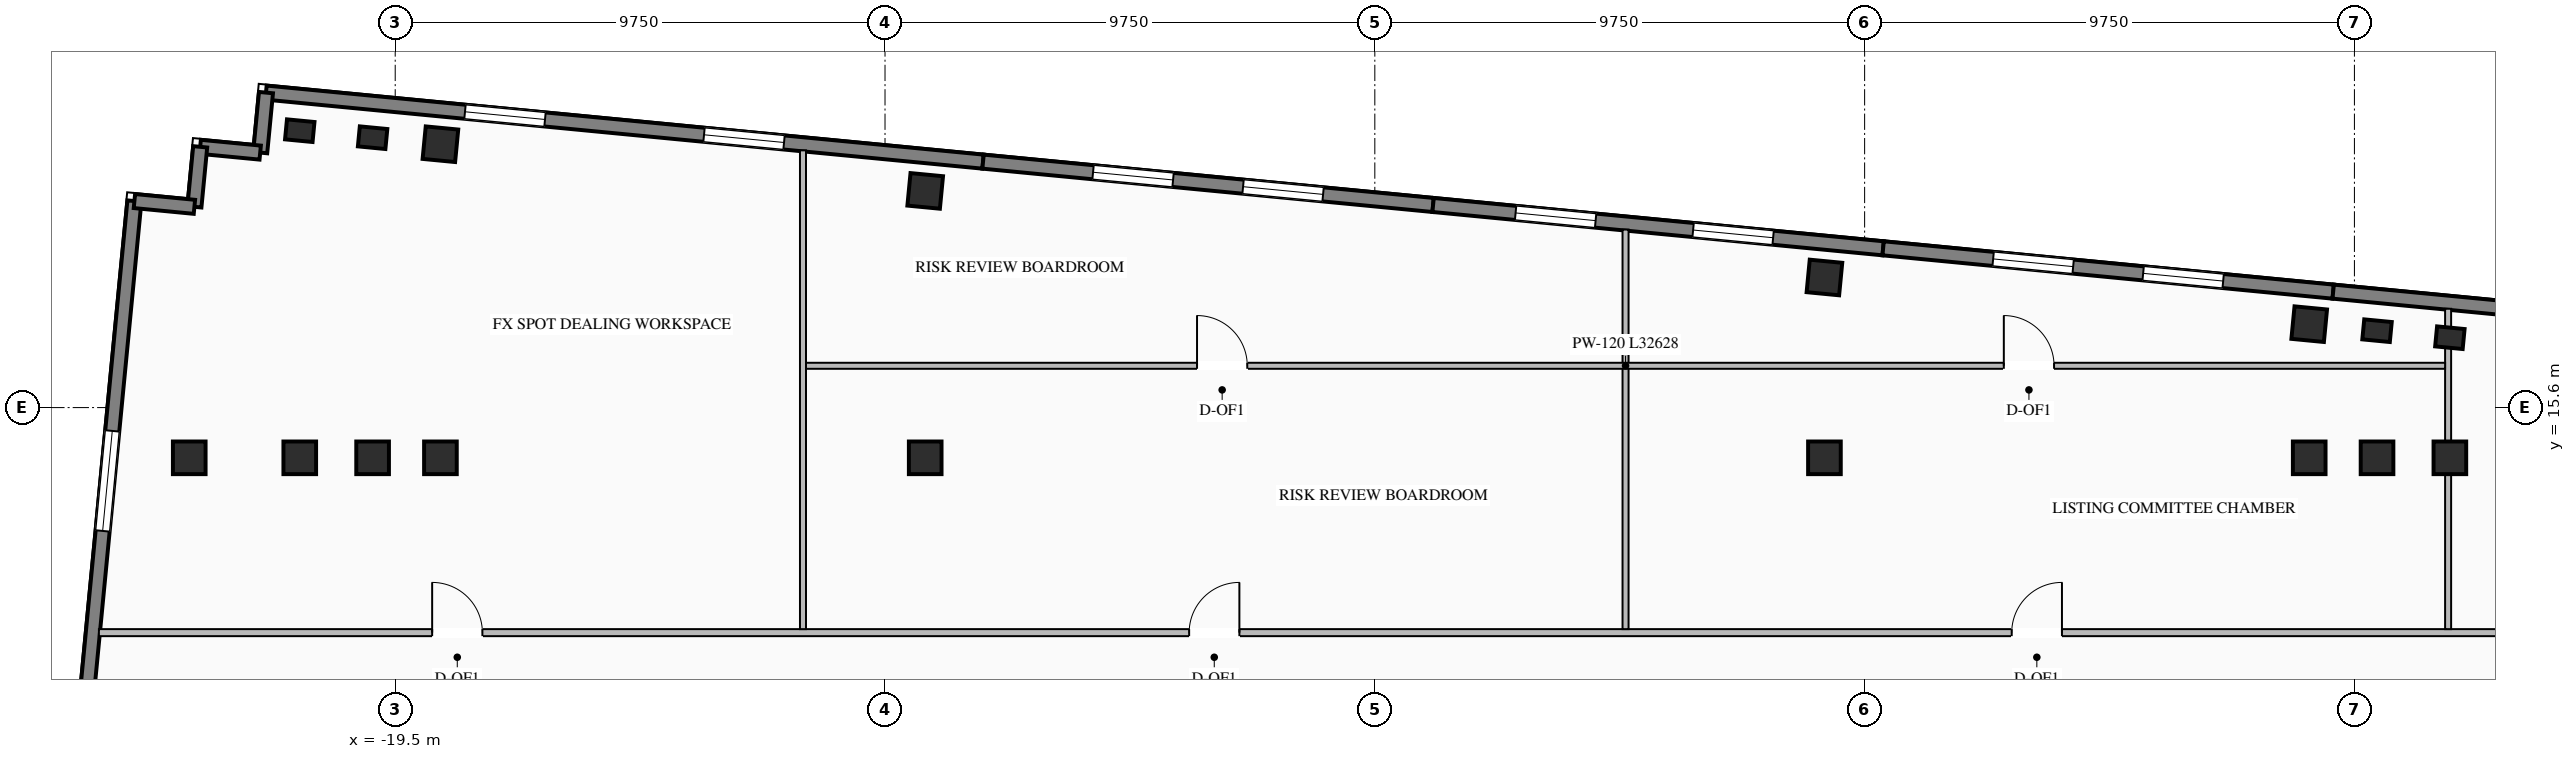
"""IFC4 building model, lengths in metres.
Left out: names, types, materials, properties, quantities, classifications, styles, units other than length and angle.
Written with IfcOpenShell. Run it as: python <this file> out.ifc"""

import sys

from ifc_helpers import new_model, si_unit, direction, frame, frame_2d, origin, origin_2d, place, context, subcontext, project, spatial, rectangle, i_section, extrude, element, fill, save


model = new_model("IFC4")
c1 = context("Model", 3, precision=1e-05, world=origin(), true_north=direction((0.0, 1.0)))
c2 = subcontext(c1, "Body", "Model", "MODEL_VIEW")
j1 = project(units=[si_unit("LENGTHUNIT", "METRE"), si_unit("PLANEANGLEUNIT", "RADIAN")], contexts=[c1])
p1 = place(None, origin())
s1 = spatial("IfcSite", under=j1, at=p1, CompositionType="ELEMENT")
p2 = place(p1, origin())
s2 = spatial("IfcBuilding", under=s1, at=p2, CompositionType="ELEMENT")
p3 = place(p2, frame((0.0, 0.0, 181.1)))
s3 = spatial("IfcBuildingStorey", under=s2, at=p3, CompositionType="ELEMENT", Elevation=181.1)
for number, where, z_axis, x_axis in (
    (1, (-21.4, 14.6, 0.0), (0.0, 0.0, 1.0), (1.0, 0.0, 0.0)),
    (2, (-19.95, 14.6, 0.0), (0.0, 0.0, 1.0), (1.0, 0.0, 0.0)),
    (3, (-18.6, 14.6, 0.0), (0.0, 0.0, 1.0), (1.0, 0.0, 0.0)),
    (4, (-8.95, 14.6, 0.0), (0.0, 0.0, 1.0), (1.0, 0.0, 0.0)),
    (5, (8.95, 14.6, 0.0), (0.0, 0.0, 1.0), (1.0, 0.0, 0.0)),
    (6, (18.6, 14.6, 0.0), (0.0, 0.0, 1.0), (1.0, 0.0, 0.0)),
    (7, (19.95, 14.6, 0.0), (0.0, 0.0, 1.0), (1.0, 0.0, 0.0)),
    (8, (21.4, 14.6, 0.0), (0.0, 0.0, 1.0), (1.0, 0.0, 0.0)),
    (9, (-23.6, 14.6, 0.0), (0.0, 0.0, 1.0), (1.0, 0.0, 0.0)),
    (10, (-18.6, 20.842, 0.0), (0.0, 0.0, 1.0), (0.995, -0.096, 0.0)),
    (11, (-8.95, 19.913, 0.0), (0.0, 0.0, 1.0), (0.995, -0.096, 0.0)),
    (12, (8.95, 18.19, 0.0), (0.0, 0.0, 1.0), (0.995, -0.096, 0.0)),
    (13, (18.6, 17.26, 0.0), (0.0, 0.0, 1.0), (0.995, -0.096, 0.0)),
):
    element("IfcColumn", number, at=place(p3, frame(where, z_axis=z_axis, x_axis=x_axis)), inside=s3, PredefinedType="COLUMN", context=c2, shape_type="SweptSolid", body=[
        extrude(i_section(OverallWidth=0.65, OverallDepth=0.65, WebThickness=0.028, FlangeThickness=0.04, at=origin_2d()), origin(), (0.0, 0.0, 1.0), 3.45),
    ])
for number, where, z_axis, x_axis in (
    (14, (-21.4, 21.112, 0.0), (0.0, 0.0, 1.0), (0.995, -0.096, 0.0)),
    (15, (-19.95, 20.972, 0.0), (0.0, 0.0, 1.0), (0.995, -0.096, 0.0)),
    (16, (19.95, 17.131, 0.0), (0.0, 0.0, 1.0), (0.995, -0.096, 0.0)),
    (17, (21.4, 16.991, 0.0), (0.0, 0.0, 1.0), (0.995, -0.096, 0.0)),
):
    element("IfcColumn", number, at=place(p3, frame(where, z_axis=z_axis, x_axis=x_axis)), inside=s3, PredefinedType="PILASTER", context=c2, shape_type="SweptSolid", body=[
        extrude(rectangle(XDim=0.55, YDim=0.4, at=origin_2d()), origin(), (0.0, 0.0, 1.0), 3.45),
    ])
p4 = place(p3, frame((-22.073, 21.87, 0.0), z_axis=(0.0, 0.0, 1.0), x_axis=(0.995395606285, -0.095851901334, 0.0)))
e18 = element("IfcWall", 18, at=p4, inside=s3, PredefinedType="STANDARD", context=c2, shape_type="SweptSolid", body=[
    extrude(rectangle(XDim=14.34, YDim=0.28, at=frame_2d((7.17, 0.0))), origin(), (0.0, 0.0, 1.0), 3.25),
])
p5 = place(p4, frame((3.98, 0.0, 0.76)))
e19 = element("IfcOpeningElement", 19, at=p5, cuts=e18, PredefinedType="OPENING", context=c2, shape_type="SweptSolid", body=[
    extrude(rectangle(XDim=1.6, YDim=1.95, at=frame_2d((0.8, 0.975))), frame((0.0, 0.15, 0.0), z_axis=(0.0, -1.0, 0.0), x_axis=(1.0, 0.0, 0.0)), (0.0, 0.0, 1.0), 0.3),
])
p6 = place(p4, frame((8.76, 0.0, 0.76)))
e20 = element("IfcOpeningElement", 20, at=p6, cuts=e18, PredefinedType="OPENING", context=c2, shape_type="SweptSolid", body=[
    extrude(rectangle(XDim=1.6, YDim=1.95, at=frame_2d((0.8, 0.975))), frame((0.0, 0.15, 0.0), z_axis=(0.0, -1.0, 0.0), x_axis=(1.0, 0.0, 0.0)), (0.0, 0.0, 1.0), 0.3),
])
p7 = place(p3, frame((-7.799, 20.496, 0.0), z_axis=(0.0, 0.0, 1.0), x_axis=(0.995396794462, -0.09583956164, 0.0)))
e21 = element("IfcWall", 21, at=p7, inside=s3, PredefinedType="STANDARD", context=c2, shape_type="SweptSolid", body=[
    extrude(rectangle(XDim=9.0, YDim=0.28, at=frame_2d((4.5, 0.0))), origin(), (0.0, 0.0, 1.0), 3.25),
])
p8 = place(p7, frame((2.2, 0.0, 0.76)))
e22 = element("IfcOpeningElement", 22, at=p8, cuts=e21, PredefinedType="OPENING", context=c2, shape_type="SweptSolid", body=[
    extrude(rectangle(XDim=1.6, YDim=1.95, at=frame_2d((0.8, 0.975))), frame((0.0, 0.15, 0.0), z_axis=(0.0, -1.0, 0.0), x_axis=(1.0, 0.0, 0.0)), (0.0, 0.0, 1.0), 0.3),
])
p9 = place(p7, frame((5.2, 0.0, 0.76)))
e23 = element("IfcOpeningElement", 23, at=p9, cuts=e21, PredefinedType="OPENING", context=c2, shape_type="SweptSolid", body=[
    extrude(rectangle(XDim=1.6, YDim=1.95, at=frame_2d((0.8, 0.975))), frame((0.0, 0.15, 0.0), z_axis=(0.0, -1.0, 0.0), x_axis=(1.0, 0.0, 0.0)), (0.0, 0.0, 1.0), 0.3),
])
p10 = place(p3, frame((1.16, 19.633, 0.0), z_axis=(0.0, 0.0, 1.0), x_axis=(0.995394455533, -0.09586385082, 0.0)))
e24 = element("IfcWall", 24, at=p10, inside=s3, PredefinedType="STANDARD", context=c2, shape_type="SweptSolid", body=[
    extrude(rectangle(XDim=9.0, YDim=0.28, at=frame_2d((4.5, 0.0))), origin(), (0.0, 0.0, 1.0), 3.25),
])
p11 = place(p10, frame((1.65, 0.0, 0.76)))
e25 = element("IfcOpeningElement", 25, at=p11, cuts=e24, PredefinedType="OPENING", context=c2, shape_type="SweptSolid", body=[
    extrude(rectangle(XDim=1.6, YDim=1.95, at=frame_2d((0.8, 0.975))), frame((0.0, 0.15, 0.0), z_axis=(0.0, -1.0, 0.0), x_axis=(1.0, 0.0, 0.0)), (0.0, 0.0, 1.0), 0.3),
])
p12 = place(p10, frame((5.2, 0.0, 0.76)))
e26 = element("IfcOpeningElement", 26, at=p12, cuts=e24, PredefinedType="OPENING", context=c2, shape_type="SweptSolid", body=[
    extrude(rectangle(XDim=1.6, YDim=1.95, at=frame_2d((0.8, 0.975))), frame((0.0, 0.15, 0.0), z_axis=(0.0, -1.0, 0.0), x_axis=(1.0, 0.0, 0.0)), (0.0, 0.0, 1.0), 0.3),
])
p13 = place(p3, frame((10.119, 18.77, 0.0), z_axis=(0.0, 0.0, 1.0), x_axis=(0.995396794462, -0.09583956164, 0.0)))
e27 = element("IfcWall", 27, at=p13, inside=s3, PredefinedType="STANDARD", context=c2, shape_type="SweptSolid", body=[
    extrude(rectangle(XDim=9.0, YDim=0.28, at=frame_2d((4.5, 0.0))), origin(), (0.0, 0.0, 1.0), 3.25),
])
p14 = place(p13, frame((2.2, 0.0, 0.76)))
e28 = element("IfcOpeningElement", 28, at=p14, cuts=e27, PredefinedType="OPENING", context=c2, shape_type="SweptSolid", body=[
    extrude(rectangle(XDim=1.6, YDim=1.95, at=frame_2d((0.8, 0.975))), frame((0.0, 0.15, 0.0), z_axis=(0.0, -1.0, 0.0), x_axis=(1.0, 0.0, 0.0)), (0.0, 0.0, 1.0), 0.3),
])
p15 = place(p13, frame((5.2, 0.0, 0.76)))
e29 = element("IfcOpeningElement", 29, at=p15, cuts=e27, PredefinedType="OPENING", context=c2, shape_type="SweptSolid", body=[
    extrude(rectangle(XDim=1.6, YDim=1.95, at=frame_2d((0.8, 0.975))), frame((0.0, 0.15, 0.0), z_axis=(0.0, -1.0, 0.0), x_axis=(1.0, 0.0, 0.0)), (0.0, 0.0, 1.0), 0.3),
])
p16 = place(p3, frame((19.077, 17.908, 0.0), z_axis=(0.0, 0.0, 1.0), x_axis=(0.995395606285, -0.095851901334, 0.0)))
e30 = element("IfcWall", 30, at=p16, inside=s3, PredefinedType="STANDARD", context=c2, shape_type="SweptSolid", body=[
    extrude(rectangle(XDim=14.34, YDim=0.28, at=frame_2d((7.17, 0.0))), origin(), (0.0, 0.0, 1.0), 3.25),
])
p17 = place(p16, frame((3.98, 0.0, 0.76)))
e31 = element("IfcOpeningElement", 31, at=p17, cuts=e30, PredefinedType="OPENING", context=c2, shape_type="SweptSolid", body=[
    extrude(rectangle(XDim=1.6, YDim=1.95, at=frame_2d((0.8, 0.975))), frame((0.0, 0.15, 0.0), z_axis=(0.0, -1.0, 0.0), x_axis=(1.0, 0.0, 0.0)), (0.0, 0.0, 1.0), 0.3),
])
p18 = place(p16, frame((8.76, 0.0, 0.76)))
e32 = element("IfcOpeningElement", 32, at=p18, cuts=e30, PredefinedType="OPENING", context=c2, shape_type="SweptSolid", body=[
    extrude(rectangle(XDim=1.6, YDim=1.95, at=frame_2d((0.8, 0.975))), frame((0.0, 0.15, 0.0), z_axis=(0.0, -1.0, 0.0), x_axis=(1.0, 0.0, 0.0)), (0.0, 0.0, 1.0), 0.3),
])
p19 = place(p3, frame((-26.301, 2.998, 0.0), z_axis=(0.0, 0.0, 1.0), x_axis=(0.095837640115, 0.99539697947, 0.0)))
e33 = element("IfcWall", 33, at=p19, inside=s3, PredefinedType="STANDARD", context=c2, shape_type="SweptSolid", body=[
    extrude(rectangle(XDim=16.79, YDim=0.28, at=frame_2d((8.395, 0.0))), origin(), (0.0, 0.0, 1.0), 3.25),
])
p20 = place(p19, frame((3.547, 0.0, 0.76)))
e34 = element("IfcOpeningElement", 34, at=p20, cuts=e33, PredefinedType="OPENING", context=c2, shape_type="SweptSolid", body=[
    extrude(rectangle(XDim=2.0, YDim=2.05, at=frame_2d((1.0, 1.025))), frame((0.0, 0.15, 0.0), z_axis=(0.0, -1.0, 0.0), x_axis=(1.0, 0.0, 0.0)), (0.0, 0.0, 1.0), 0.3),
])
p21 = place(p19, frame((10.193, 0.0, 0.76)))
e35 = element("IfcOpeningElement", 35, at=p21, cuts=e33, PredefinedType="OPENING", context=c2, shape_type="SweptSolid", body=[
    extrude(rectangle(XDim=2.0, YDim=2.05, at=frame_2d((1.0, 1.025))), frame((0.0, 0.15, 0.0), z_axis=(0.0, -1.0, 0.0), x_axis=(1.0, 0.0, 0.0)), (0.0, 0.0, 1.0), 0.3),
])
for number, where, z_axis, x_axis in (
    (36, (-22.073, 21.87, 0.0), (0.0, 0.0, 1.0), (-0.096, -0.995, 0.0)),
    (37, (-22.188, 20.676, 0.0), (0.0, 0.0, 1.0), (-0.995, 0.096, 0.0)),
    (38, (-23.382, 20.791, 0.0), (0.0, 0.0, 1.0), (-0.096, -0.995, 0.0)),
    (39, (-23.497, 19.596, 0.0), (0.0, 0.0, 1.0), (-0.995, 0.096, 0.0)),
):
    element("IfcWall", number, at=place(p3, frame(where, z_axis=z_axis, x_axis=x_axis)), inside=s3, PredefinedType="STANDARD", context=c2, shape_type="SweptSolid", body=[
        extrude(rectangle(XDim=1.2, YDim=0.28, at=frame_2d((0.6, 0.0))), origin(), (0.0, 0.0, 1.0), 3.25),
    ])
p22 = place(p3, frame((-25.398, 11.12, 0.0), z_axis=(0.0, 0.0, 1.0), x_axis=(1.0, 0.0, 0.0)))
e40 = element("IfcWall", 40, at=p22, inside=s3, PredefinedType="STANDARD", context=c2, shape_type="SweptSolid", body=[
    extrude(rectangle(XDim=60.519, YDim=0.14, at=frame_2d((30.259, 0.0))), origin(), (0.0, 0.0, 1.0), 3.25),
])
p23 = place(p22, frame((6.634, 0.0, 0.0)))
e41 = element("IfcOpeningElement", 41, at=p23, cuts=e40, PredefinedType="OPENING", context=c2, shape_type="SweptSolid", body=[
    extrude(rectangle(XDim=1.0, YDim=2.08, at=frame_2d((0.5, 1.04))), frame((0.0, 0.08, 0.0), z_axis=(0.0, -1.0, 0.0), x_axis=(1.0, 0.0, 0.0)), (0.0, 0.0, 1.0), 0.16),
])
p24 = place(p22, frame((21.702, 0.0, 0.0)))
e42 = element("IfcOpeningElement", 42, at=p24, cuts=e40, PredefinedType="OPENING", context=c2, shape_type="SweptSolid", body=[
    extrude(rectangle(XDim=1.0, YDim=2.08, at=frame_2d((0.5, 1.04))), frame((0.0, 0.08, 0.0), z_axis=(0.0, -1.0, 0.0), x_axis=(1.0, 0.0, 0.0)), (0.0, 0.0, 1.0), 0.16),
])
p25 = place(p22, frame((38.076, 0.0, 0.0)))
e43 = element("IfcOpeningElement", 43, at=p25, cuts=e40, PredefinedType="OPENING", context=c2, shape_type="SweptSolid", body=[
    extrude(rectangle(XDim=1.0, YDim=2.08, at=frame_2d((0.5, 1.04))), frame((0.0, 0.08, 0.0), z_axis=(0.0, -1.0, 0.0), x_axis=(1.0, 0.0, 0.0)), (0.0, 0.0, 1.0), 0.16),
])
p26 = place(p22, frame((53.015, 0.0, 0.0)))
e44 = element("IfcOpeningElement", 44, at=p26, cuts=e40, PredefinedType="OPENING", context=c2, shape_type="SweptSolid", body=[
    extrude(rectangle(XDim=1.0, YDim=2.08, at=frame_2d((0.5, 1.04))), frame((0.0, 0.08, 0.0), z_axis=(0.0, -1.0, 0.0), x_axis=(1.0, 0.0, 0.0)), (0.0, 0.0, 1.0), 0.16),
])
p27 = place(p3, frame((-11.383, 11.19, 0.0), z_axis=(0.0, 0.0, 1.0), x_axis=(0.0, 1.0, 0.0)))
e45 = element("IfcWall", 45, at=p27, inside=s3, PredefinedType="STANDARD", context=c2, shape_type="SweptSolid", body=[
    extrude(rectangle(XDim=9.53, YDim=0.12, at=frame_2d((4.765, 0.0))), origin(), (0.0, 0.0, 1.0), 3.25),
])
p28 = place(p3, frame((4.991, 11.19, 0.0), z_axis=(0.0, 0.0, 1.0), x_axis=(0.0, 1.0, 0.0)))
e46 = element("IfcWall", 46, at=p28, inside=s3, PredefinedType="STANDARD", context=c2, shape_type="SweptSolid", body=[
    extrude(rectangle(XDim=7.954, YDim=0.12, at=frame_2d((3.977, 0.0))), origin(), (0.0, 0.0, 1.0), 3.25),
])
p29 = place(p3, frame((21.365, 11.19, 0.0), z_axis=(0.0, 0.0, 1.0), x_axis=(0.0, 1.0, 0.0)))
e47 = element("IfcWall", 47, at=p29, inside=s3, PredefinedType="STANDARD", context=c2, shape_type="SweptSolid", body=[
    extrude(rectangle(XDim=6.377, YDim=0.12, at=frame_2d((3.188, 0.0))), origin(), (0.0, 0.0, 1.0), 2.645),
])
p30 = place(p3, frame((-11.323, 16.432, 0.0), z_axis=(0.0, 0.0, 1.0), x_axis=(1.0, 0.0, 0.0)))
e48 = element("IfcWall", 48, at=p30, inside=s3, PredefinedType="STANDARD", context=c2, shape_type="SweptSolid", body=[
    extrude(rectangle(XDim=32.628, YDim=0.12, at=frame_2d((16.314, 0.0))), origin(), (0.0, 0.0, 1.0), 3.25),
])
p31 = place(p30, frame((7.784, 0.0, 0.0)))
e49 = element("IfcOpeningElement", 49, at=p31, cuts=e48, PredefinedType="OPENING", context=c2, shape_type="SweptSolid", body=[
    extrude(rectangle(XDim=1.0, YDim=2.08, at=frame_2d((0.5, 1.04))), frame((0.0, 0.07, 0.0), z_axis=(0.0, -1.0, 0.0), x_axis=(1.0, 0.0, 0.0)), (0.0, 0.0, 1.0), 0.14),
])
p32 = place(p30, frame((23.844, 0.0, 0.0)))
e50 = element("IfcOpeningElement", 50, at=p32, cuts=e48, PredefinedType="OPENING", context=c2, shape_type="SweptSolid", body=[
    extrude(rectangle(XDim=1.0, YDim=2.08, at=frame_2d((0.5, 1.04))), frame((0.0, 0.07, 0.0), z_axis=(0.0, -1.0, 0.0), x_axis=(1.0, 0.0, 0.0)), (0.0, 0.0, 1.0), 0.14),
])
p33 = place(p5, origin())
e51 = element("IfcWindow", 51, at=p33, inside=s3, PartitioningType="SINGLE_PANEL", PredefinedType="WINDOW", context=c2, shape_type="SweptSolid", body=[
    extrude(rectangle(XDim=1.6, YDim=1.95, at=frame_2d((0.8, 0.975))), frame((0.0, 0.03, 0.0), z_axis=(0.0, -1.0, 0.0), x_axis=(1.0, 0.0, 0.0)), (0.0, 0.0, 1.0), 0.06),
])
fill(e19, e51)
p34 = place(p6, origin())
e52 = element("IfcWindow", 52, at=p34, inside=s3, PartitioningType="SINGLE_PANEL", PredefinedType="WINDOW", context=c2, shape_type="SweptSolid", body=[
    extrude(rectangle(XDim=1.6, YDim=1.95, at=frame_2d((0.8, 0.975))), frame((0.0, 0.03, 0.0), z_axis=(0.0, -1.0, 0.0), x_axis=(1.0, 0.0, 0.0)), (0.0, 0.0, 1.0), 0.06),
])
fill(e20, e52)
p35 = place(p8, origin())
e53 = element("IfcWindow", 53, at=p35, inside=s3, PartitioningType="SINGLE_PANEL", PredefinedType="WINDOW", context=c2, shape_type="SweptSolid", body=[
    extrude(rectangle(XDim=1.6, YDim=1.95, at=frame_2d((0.8, 0.975))), frame((0.0, 0.03, 0.0), z_axis=(0.0, -1.0, 0.0), x_axis=(1.0, 0.0, 0.0)), (0.0, 0.0, 1.0), 0.06),
])
fill(e22, e53)
p36 = place(p9, origin())
e54 = element("IfcWindow", 54, at=p36, inside=s3, PartitioningType="SINGLE_PANEL", PredefinedType="WINDOW", context=c2, shape_type="SweptSolid", body=[
    extrude(rectangle(XDim=1.6, YDim=1.95, at=frame_2d((0.8, 0.975))), frame((0.0, 0.03, 0.0), z_axis=(0.0, -1.0, 0.0), x_axis=(1.0, 0.0, 0.0)), (0.0, 0.0, 1.0), 0.06),
])
fill(e23, e54)
p37 = place(p11, origin())
e55 = element("IfcWindow", 55, at=p37, inside=s3, PartitioningType="SINGLE_PANEL", PredefinedType="WINDOW", context=c2, shape_type="SweptSolid", body=[
    extrude(rectangle(XDim=1.6, YDim=1.95, at=frame_2d((0.8, 0.975))), frame((0.0, 0.03, 0.0), z_axis=(0.0, -1.0, 0.0), x_axis=(1.0, 0.0, 0.0)), (0.0, 0.0, 1.0), 0.06),
])
fill(e25, e55)
p38 = place(p12, origin())
e56 = element("IfcWindow", 56, at=p38, inside=s3, PartitioningType="SINGLE_PANEL", PredefinedType="WINDOW", context=c2, shape_type="SweptSolid", body=[
    extrude(rectangle(XDim=1.6, YDim=1.95, at=frame_2d((0.8, 0.975))), frame((0.0, 0.03, 0.0), z_axis=(0.0, -1.0, 0.0), x_axis=(1.0, 0.0, 0.0)), (0.0, 0.0, 1.0), 0.06),
])
fill(e26, e56)
p39 = place(p14, origin())
e57 = element("IfcWindow", 57, at=p39, inside=s3, PartitioningType="SINGLE_PANEL", PredefinedType="WINDOW", context=c2, shape_type="SweptSolid", body=[
    extrude(rectangle(XDim=1.6, YDim=1.95, at=frame_2d((0.8, 0.975))), frame((0.0, 0.03, 0.0), z_axis=(0.0, -1.0, 0.0), x_axis=(1.0, 0.0, 0.0)), (0.0, 0.0, 1.0), 0.06),
])
fill(e28, e57)
p40 = place(p15, origin())
e58 = element("IfcWindow", 58, at=p40, inside=s3, PartitioningType="SINGLE_PANEL", PredefinedType="WINDOW", context=c2, shape_type="SweptSolid", body=[
    extrude(rectangle(XDim=1.6, YDim=1.95, at=frame_2d((0.8, 0.975))), frame((0.0, 0.03, 0.0), z_axis=(0.0, -1.0, 0.0), x_axis=(1.0, 0.0, 0.0)), (0.0, 0.0, 1.0), 0.06),
])
fill(e29, e58)
p41 = place(p21, origin())
e59 = element("IfcWindow", 59, at=p41, inside=s3, PartitioningType="DOUBLE_PANEL_VERTICAL", PredefinedType="WINDOW", context=c2, shape_type="SweptSolid", body=[
    extrude(rectangle(XDim=2.0, YDim=2.05, at=frame_2d((1.0, 1.025))), frame((0.0, 0.03, 0.0), z_axis=(0.0, -1.0, 0.0), x_axis=(1.0, 0.0, 0.0)), (0.0, 0.0, 1.0), 0.06),
])
fill(e35, e59)
p42 = place(p23, origin())
e60 = element("IfcDoor", 60, at=p42, inside=s3, OperationType="SINGLE_SWING_LEFT", PredefinedType="DOOR", context=c2, shape_type="SweptSolid", body=[
    extrude(rectangle(XDim=1.0, YDim=2.08, at=frame_2d((0.5, 1.04))), frame((0.0, 0.025, 0.0), z_axis=(0.0, -1.0, 0.0), x_axis=(1.0, 0.0, 0.0)), (0.0, 0.0, 1.0), 0.05),
])
fill(e41, e60)
p43 = place(p24, origin())
e61 = element("IfcDoor", 61, at=p43, inside=s3, OperationType="SINGLE_SWING_RIGHT", PredefinedType="DOOR", context=c2, shape_type="SweptSolid", body=[
    extrude(rectangle(XDim=1.0, YDim=2.08, at=frame_2d((0.5, 1.04))), frame((0.0, 0.025, 0.0), z_axis=(0.0, -1.0, 0.0), x_axis=(1.0, 0.0, 0.0)), (0.0, 0.0, 1.0), 0.05),
])
fill(e42, e61)
p44 = place(p31, origin())
e62 = element("IfcDoor", 62, at=p44, inside=s3, OperationType="SINGLE_SWING_LEFT", PredefinedType="DOOR", context=c2, shape_type="SweptSolid", body=[
    extrude(rectangle(XDim=1.0, YDim=2.08, at=frame_2d((0.5, 1.04))), frame((0.0, 0.025, 0.0), z_axis=(0.0, -1.0, 0.0), x_axis=(1.0, 0.0, 0.0)), (0.0, 0.0, 1.0), 0.05),
])
fill(e49, e62)
p45 = place(p25, origin())
e63 = element("IfcDoor", 63, at=p45, inside=s3, OperationType="SINGLE_SWING_RIGHT", PredefinedType="DOOR", context=c2, shape_type="SweptSolid", body=[
    extrude(rectangle(XDim=1.0, YDim=2.08, at=frame_2d((0.5, 1.04))), frame((0.0, 0.025, 0.0), z_axis=(0.0, -1.0, 0.0), x_axis=(1.0, 0.0, 0.0)), (0.0, 0.0, 1.0), 0.05),
])
fill(e43, e63)
p46 = place(p32, origin())
e64 = element("IfcDoor", 64, at=p46, inside=s3, OperationType="SINGLE_SWING_LEFT", PredefinedType="DOOR", context=c2, shape_type="SweptSolid", body=[
    extrude(rectangle(XDim=1.0, YDim=2.08, at=frame_2d((0.5, 1.04))), frame((0.0, 0.025, 0.0), z_axis=(0.0, -1.0, 0.0), x_axis=(1.0, 0.0, 0.0)), (0.0, 0.0, 1.0), 0.05),
])
fill(e50, e64)
save(model, sys.argv[1])
